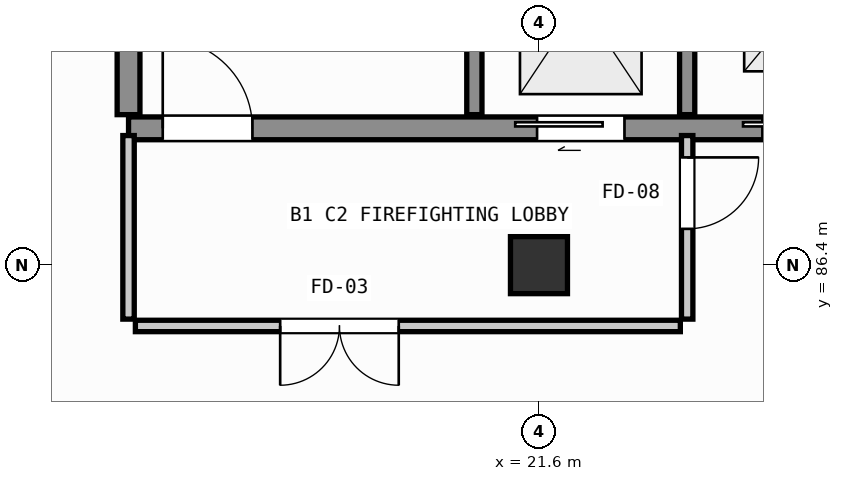
"""IFC4 building model, lengths in metres.
Left out: names, types, materials, properties, quantities, classifications, styles, units other than length and angle.
Written with IfcOpenShell. Run it as: python <this file> out.ifc"""

import sys

from ifc_helpers import new_model, si_unit, direction, frame, frame_2d, origin, origin_2d, place, context, subcontext, project, spatial, rectangle, extrude, element, fill, save


model = new_model("IFC4")
c1 = context("Model", 3, precision=1e-05, world=origin(), true_north=direction((0.0, 1.0)))
c2 = subcontext(c1, "Body", "Model", "MODEL_VIEW")
j1 = project(units=[si_unit("LENGTHUNIT", "METRE"), si_unit("PLANEANGLEUNIT", "RADIAN")], contexts=[c1])
p1 = place(None, origin())
s1 = spatial("IfcSite", under=j1, at=p1, CompositionType="ELEMENT")
p2 = place(p1, origin())
s2 = spatial("IfcBuilding", under=s1, at=p2, CompositionType="ELEMENT")
p3 = place(p2, frame((0.0, 0.0, -4.5)))
s3 = spatial("IfcBuildingStorey", under=s2, at=p3, CompositionType="ELEMENT", Elevation=-4.5)
p4 = place(p3, frame((21.6, 86.4, -0.5), z_axis=(0.0, 0.0, 1.0), x_axis=(1.0, 0.0, 0.0)))
e1 = element("IfcColumn", 1, at=p4, inside=s3, PredefinedType="COLUMN", context=c2, shape_type="SweptSolid", body=[
    extrude(rectangle(XDim=0.75, YDim=0.75, at=origin_2d()), origin(), (0.0, 0.0, 1.0), 4.75),
])
p5 = place(p3, frame((16.2, 88.2, -0.5), z_axis=(0.0, 0.0, 1.0), x_axis=(1.0, 0.0, 0.0)))
e2 = element("IfcWall", 2, at=p5, inside=s3, PredefinedType="SHEAR", context=c2, shape_type="SweptSolid", body=[
    extrude(rectangle(XDim=10.8, YDim=0.3, at=frame_2d((5.4, 0.0))), origin(), (0.0, 0.0, 1.0), 5.0),
])
p6 = place(p5, frame((0.45, 0.0, 0.5)))
e3 = element("IfcOpeningElement", 3, at=p6, cuts=e2, PredefinedType="OPENING", context=c2, shape_type="SweptSolid", body=[
    extrude(rectangle(XDim=1.18, YDim=2.16, at=frame_2d((0.59, 1.08))), frame((0.0, 0.16, 0.0), z_axis=(0.0, -1.0, 0.0), x_axis=(1.0, 0.0, 0.0)), (0.0, 0.0, 1.0), 0.32),
])
p7 = place(p5, frame((5.375, 0.0, 0.5)))
e4 = element("IfcOpeningElement", 4, at=p7, cuts=e2, PredefinedType="OPENING", context=c2, shape_type="SweptSolid", body=[
    extrude(rectangle(XDim=1.15, YDim=2.15, at=frame_2d((0.575, 1.075))), frame((0.0, 0.16, 0.0), z_axis=(0.0, -1.0, 0.0), x_axis=(1.0, 0.0, 0.0)), (0.0, 0.0, 1.0), 0.32),
])
p8 = place(p5, frame((8.34, 0.0, 0.5)))
e5 = element("IfcOpeningElement", 5, at=p8, cuts=e2, PredefinedType="OPENING", context=c2, shape_type="SweptSolid", body=[
    extrude(rectangle(XDim=1.02, YDim=2.12, at=frame_2d((0.51, 1.06))), frame((0.0, 0.16, 0.0), z_axis=(0.0, -1.0, 0.0), x_axis=(1.0, 0.0, 0.0)), (0.0, 0.0, 1.0), 0.32),
])
p9 = place(p3, frame((16.2, 88.38, -0.5), z_axis=(0.0, 0.0, 1.0), x_axis=(0.0, 1.0, 0.0)))
e6 = element("IfcWall", 6, at=p9, inside=s3, PredefinedType="SHEAR", context=c2, shape_type="SweptSolid", body=[
    extrude(rectangle(XDim=6.24, YDim=0.3, at=frame_2d((3.12, 0.0))), origin(), (0.0, 0.0, 1.0), 5.0),
])
for number, where, z_axis, x_axis in (
    (7, (20.75, 88.38, -0.5), (0.0, 0.0, 1.0), (0.0, 1.0, 0.0)),
    (8, (23.55, 88.38, -0.5), (0.0, 0.0, 1.0), (0.0, 1.0, 0.0)),
):
    element("IfcWall", number, at=place(p3, frame(where, z_axis=z_axis, x_axis=x_axis)), inside=s3, PredefinedType="SHEAR", context=c2, shape_type="SweptSolid", body=[
        extrude(rectangle(XDim=3.15, YDim=0.2, at=frame_2d((1.575, 0.0))), origin(), (0.0, 0.0, 1.0), 5.0),
    ])
p10 = place(p3, frame((16.2, 85.69, 0.0), z_axis=(0.0, 0.0, 1.0), x_axis=(0.0, 1.0, 0.0)))
e9 = element("IfcWall", 9, at=p10, inside=s3, PredefinedType="PARTITIONING", context=c2, shape_type="SweptSolid", body=[
    extrude(rectangle(XDim=2.415, YDim=0.15, at=frame_2d((1.208, 0.0))), origin(), (0.0, 0.0, 1.0), 3.4),
])
p11 = place(p3, frame((23.55, 88.105, 0.0), z_axis=(0.0, 0.0, 1.0), x_axis=(0.0, -1.0, 0.0)))
e10 = element("IfcWall", 10, at=p11, inside=s3, PredefinedType="PARTITIONING", context=c2, shape_type="SweptSolid", body=[
    extrude(rectangle(XDim=2.415, YDim=0.15, at=frame_2d((1.208, 0.0))), origin(), (0.0, 0.0, 1.0), 3.4),
])
p12 = place(p11, frame((0.288, 0.0, 0.0)))
e11 = element("IfcOpeningElement", 11, at=p12, cuts=e10, PredefinedType="OPENING", context=c2, shape_type="SweptSolid", body=[
    extrude(rectangle(XDim=0.94, YDim=2.1, at=frame_2d((0.47, 1.05))), frame((0.0, 0.085, 0.0), z_axis=(0.0, -1.0, 0.0), x_axis=(1.0, 0.0, 0.0)), (0.0, 0.0, 1.0), 0.17),
])
p13 = place(p3, frame((23.46, 85.6, 0.0), z_axis=(0.0, 0.0, 1.0), x_axis=(-1.0, 0.0, 0.0)))
e12 = element("IfcWall", 12, at=p13, inside=s3, PredefinedType="PARTITIONING", context=c2, shape_type="SweptSolid", body=[
    extrude(rectangle(XDim=7.17, YDim=0.15, at=frame_2d((3.585, 0.0))), origin(), (0.0, 0.0, 1.0), 4.27),
])
p14 = place(p13, frame((3.705, 0.0, 0.0)))
e13 = element("IfcOpeningElement", 13, at=p14, cuts=e12, PredefinedType="OPENING", context=c2, shape_type="SweptSolid", body=[
    extrude(rectangle(XDim=1.56, YDim=2.22, at=frame_2d((0.78, 1.11))), frame((0.0, 0.085, 0.0), z_axis=(0.0, -1.0, 0.0), x_axis=(1.0, 0.0, 0.0)), (0.0, 0.0, 1.0), 0.17),
])
p15 = place(p6, origin())
e14 = element("IfcDoor", 14, at=p15, inside=s3, OperationType="SINGLE_SWING_LEFT", PredefinedType="DOOR", context=c2, shape_type="SweptSolid", body=[
    extrude(rectangle(XDim=1.18, YDim=2.16, at=frame_2d((0.59, 1.08))), frame((0.0, 0.025, 0.0), z_axis=(0.0, -1.0, 0.0), x_axis=(1.0, 0.0, 0.0)), (0.0, 0.0, 1.0), 0.05),
])
fill(e3, e14)
p16 = place(p7, origin())
e15 = element("IfcDoor", 15, at=p16, inside=s3, OperationType="DOUBLE_DOOR_SLIDING", PredefinedType="DOOR", context=c2, shape_type="SweptSolid", body=[
    extrude(rectangle(XDim=1.15, YDim=2.15, at=frame_2d((0.575, 1.075))), frame((0.0, 0.025, 0.0), z_axis=(0.0, -1.0, 0.0), x_axis=(1.0, 0.0, 0.0)), (0.0, 0.0, 1.0), 0.05),
])
fill(e4, e15)
p17 = place(p8, origin())
e16 = element("IfcDoor", 16, at=p17, inside=s3, OperationType="SLIDING_TO_LEFT", PredefinedType="DOOR", context=c2, shape_type="SweptSolid", body=[
    extrude(rectangle(XDim=1.02, YDim=2.12, at=frame_2d((0.51, 1.06))), frame((0.0, 0.025, 0.0), z_axis=(0.0, -1.0, 0.0), x_axis=(1.0, 0.0, 0.0)), (0.0, 0.0, 1.0), 0.05),
])
fill(e5, e16)
p18 = place(p12, origin())
e17 = element("IfcDoor", 17, at=p18, inside=s3, OperationType="SINGLE_SWING_LEFT", PredefinedType="DOOR", context=c2, shape_type="SweptSolid", body=[
    extrude(rectangle(XDim=0.94, YDim=2.1, at=frame_2d((0.47, 1.05))), frame((0.0, 0.025, 0.0), z_axis=(0.0, -1.0, 0.0), x_axis=(1.0, 0.0, 0.0)), (0.0, 0.0, 1.0), 0.05),
])
fill(e11, e17)
p19 = place(p14, origin())
e18 = element("IfcDoor", 18, at=p19, inside=s3, OperationType="DOUBLE_DOOR_SINGLE_SWING", PredefinedType="DOOR", context=c2, shape_type="SweptSolid", body=[
    extrude(rectangle(XDim=1.56, YDim=2.22, at=frame_2d((0.78, 1.11))), frame((0.0, 0.025, 0.0), z_axis=(0.0, -1.0, 0.0), x_axis=(1.0, 0.0, 0.0)), (0.0, 0.0, 1.0), 0.05),
])
fill(e13, e18)
save(model, sys.argv[1])
